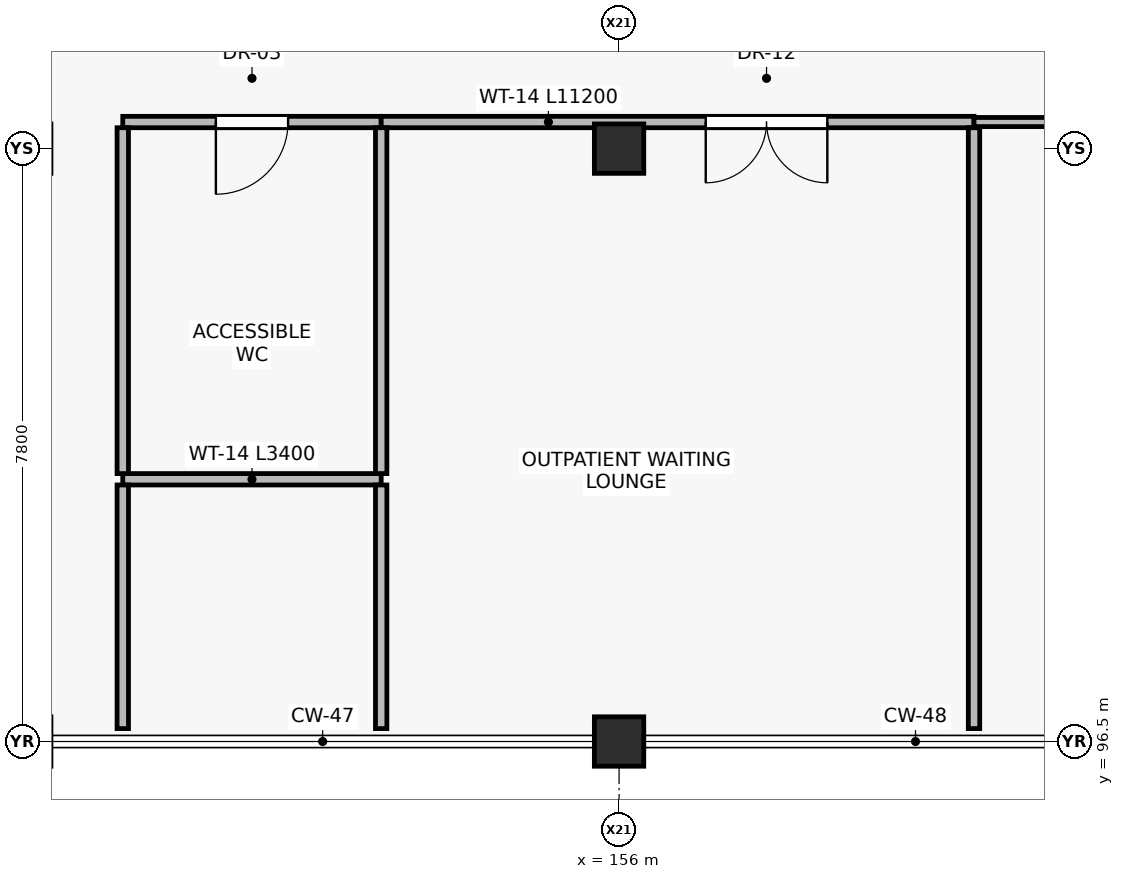
"""IFC4 building model, lengths in metres.
Left out: names, types, materials, properties, quantities, classifications, styles, units other than length and angle.
Written with IfcOpenShell. Run it as: python <this file> out.ifc"""

import sys

from ifc_helpers import new_model, si_unit, direction, frame, frame_2d, origin, origin_2d, place, context, subcontext, project, spatial, rectangle, extrude, element, fill, save


model = new_model("IFC4")
c1 = context("Model", 3, precision=1e-05, world=origin(), true_north=direction((0.0, 1.0)))
c2 = subcontext(c1, "Body", "Model", "MODEL_VIEW")
j1 = project(units=[si_unit("LENGTHUNIT", "METRE"), si_unit("PLANEANGLEUNIT", "RADIAN")], contexts=[c1])
p1 = place(None, origin())
s1 = spatial("IfcSite", under=j1, at=p1, CompositionType="ELEMENT")
p2 = place(p1, origin())
s2 = spatial("IfcBuilding", under=s1, at=p2, CompositionType="ELEMENT")
p3 = place(p2, origin())
s3 = spatial("IfcBuildingStorey", under=s2, at=p3, CompositionType="ELEMENT", Elevation=0.0)
for number, where, z_axis, x_axis in (
    (1, (156.0, 96.5, 0.0), (0.0, 0.0, 1.0), (1.0, 0.0, 0.0)),
    (2, (156.0, 104.3, 0.0), (0.0, 0.0, 1.0), (1.0, 0.0, 0.0)),
):
    element("IfcColumn", number, at=place(p3, frame(where, z_axis=z_axis, x_axis=x_axis)), inside=s3, PredefinedType="COLUMN", context=c2, shape_type="SweptSolid", body=[
        extrude(rectangle(XDim=0.65, YDim=0.65, at=origin_2d()), origin(), (0.0, 0.0, 1.0), 4.8),
    ])
p4 = place(p3, frame((152.87, 104.65, 0.0), z_axis=(0.0, 0.0, 1.0), x_axis=(-1.0, 0.0, 0.0)))
e3 = element("IfcWall", 3, at=p4, inside=s3, PredefinedType="PARTITIONING", context=c2, shape_type="SweptSolid", body=[
    extrude(rectangle(XDim=3.4, YDim=0.15, at=frame_2d((1.7, 0.0))), origin(), (0.0, 0.0, 1.0), 4.04),
])
p5 = place(p4, frame((1.225, 0.0, 0.0)))
e4 = element("IfcOpeningElement", 4, at=p5, cuts=e3, PredefinedType="OPENING", context=c2, shape_type="SweptSolid", body=[
    extrude(rectangle(XDim=0.95, YDim=2.1, at=frame_2d((0.475, 1.05))), frame((0.0, 0.085, 0.0), z_axis=(0.0, -1.0, 0.0), x_axis=(1.0, 0.0, 0.0)), (0.0, 0.0, 1.0), 0.17),
])
p6 = place(p3, frame((149.47, 99.95, 0.0), z_axis=(0.0, 0.0, 1.0), x_axis=(1.0, 0.0, 0.0)))
e5 = element("IfcWall", 5, at=p6, inside=s3, PredefinedType="PARTITIONING", context=c2, shape_type="SweptSolid", body=[
    extrude(rectangle(XDim=3.4, YDim=0.15, at=frame_2d((1.7, 0.0))), origin(), (0.0, 0.0, 1.0), 4.54),
])
p7 = place(p3, frame((160.67, 104.65, 0.0), z_axis=(0.0, 0.0, 1.0), x_axis=(-1.0, 0.0, 0.0)))
e6 = element("IfcWall", 6, at=p7, inside=s3, PredefinedType="PARTITIONING", context=c2, shape_type="SweptSolid", body=[
    extrude(rectangle(XDim=7.8, YDim=0.15, at=frame_2d((3.9, 0.0))), origin(), (0.0, 0.0, 1.0), 4.04),
])
p8 = place(p7, frame((1.93, 0.0, 0.0)))
e7 = element("IfcOpeningElement", 7, at=p8, cuts=e6, PredefinedType="OPENING", context=c2, shape_type="SweptSolid", body=[
    extrude(rectangle(XDim=1.6, YDim=2.2, at=frame_2d((0.8, 1.1))), frame((0.0, 0.085, 0.0), z_axis=(0.0, -1.0, 0.0), x_axis=(1.0, 0.0, 0.0)), (0.0, 0.0, 1.0), 0.17),
])
p9 = place(p3, frame((167.83, 104.65, 0.0), z_axis=(0.0, 0.0, 1.0), x_axis=(-1.0, 0.0, 0.0)))
e8 = element("IfcWall", 8, at=p9, inside=s3, PredefinedType="PARTITIONING", context=c2, shape_type="SweptSolid", body=[
    extrude(rectangle(XDim=7.16, YDim=0.12, at=frame_2d((3.58, 0.0))), origin(), (0.0, 0.0, 1.0), 4.04),
])
p10 = place(p9, frame((1.931, 0.0, 0.0)))
e9 = element("IfcOpeningElement", 9, at=p10, cuts=e8, PredefinedType="OPENING", context=c2, shape_type="SweptSolid", body=[
    extrude(rectangle(XDim=1.15, YDim=2.2, at=frame_2d((0.575, 1.1))), frame((0.0, 0.07, 0.0), z_axis=(0.0, -1.0, 0.0), x_axis=(1.0, 0.0, 0.0)), (0.0, 0.0, 1.0), 0.14),
])
for number, where, z_axis, x_axis in (
    (10, (149.47, 100.025, 0.0), (0.0, 0.0, 1.0), (0.0, 1.0, 0.0)),
    (11, (152.87, 100.025, 0.0), (0.0, 0.0, 1.0), (0.0, 1.0, 0.0)),
):
    element("IfcWall", number, at=place(p3, frame(where, z_axis=z_axis, x_axis=x_axis)), inside=s3, PredefinedType="PARTITIONING", context=c2, shape_type="SweptSolid", body=[
        extrude(rectangle(XDim=4.55, YDim=0.15, at=frame_2d((2.275, 0.0))), origin(), (0.0, 0.0, 1.0), 4.54),
    ])
p11 = place(p3, frame((152.87, 96.67, 0.0), z_axis=(0.0, 0.0, 1.0), x_axis=(0.0, 1.0, 0.0)))
e12 = element("IfcWall", 12, at=p11, inside=s3, PredefinedType="PARTITIONING", context=c2, shape_type="SweptSolid", body=[
    extrude(rectangle(XDim=3.205, YDim=0.15, at=frame_2d((1.603, 0.0))), origin(), (0.0, 0.0, 1.0), 4.54),
])
p12 = place(p3, frame((160.67, 96.67, 0.0), z_axis=(0.0, 0.0, 1.0), x_axis=(0.0, 1.0, 0.0)))
e13 = element("IfcWall", 13, at=p12, inside=s3, PredefinedType="PARTITIONING", context=c2, shape_type="SweptSolid", body=[
    extrude(rectangle(XDim=7.905, YDim=0.15, at=frame_2d((3.953, 0.0))), origin(), (0.0, 0.0, 1.0), 4.54),
])
p13 = place(p3, frame((149.47, 96.67, 0.0), z_axis=(0.0, 0.0, 1.0), x_axis=(0.0, 1.0, 0.0)))
e14 = element("IfcWall", 14, at=p13, inside=s3, PredefinedType="PARTITIONING", context=c2, shape_type="SweptSolid", body=[
    extrude(rectangle(XDim=3.205, YDim=0.15, at=frame_2d((1.603, 0.0))), origin(), (0.0, 0.0, 1.0), 4.54),
])
p14 = place(p5, origin())
e15 = element("IfcDoor", 15, at=p14, inside=s3, OperationType="SINGLE_SWING_RIGHT", PredefinedType="DOOR", context=c2, shape_type="SweptSolid", body=[
    extrude(rectangle(XDim=0.95, YDim=2.1, at=frame_2d((0.475, 1.05))), frame((0.0, 0.025, 0.0), z_axis=(0.0, -1.0, 0.0), x_axis=(1.0, 0.0, 0.0)), (0.0, 0.0, 1.0), 0.05),
])
fill(e4, e15)
p15 = place(p8, origin())
e16 = element("IfcDoor", 16, at=p15, inside=s3, OperationType="DOUBLE_DOOR_SINGLE_SWING", PredefinedType="DOOR", context=c2, shape_type="SweptSolid", body=[
    extrude(rectangle(XDim=1.6, YDim=2.2, at=frame_2d((0.8, 1.1))), frame((0.0, 0.025, 0.0), z_axis=(0.0, -1.0, 0.0), x_axis=(1.0, 0.0, 0.0)), (0.0, 0.0, 1.0), 0.05),
])
fill(e7, e16)
save(model, sys.argv[1])
